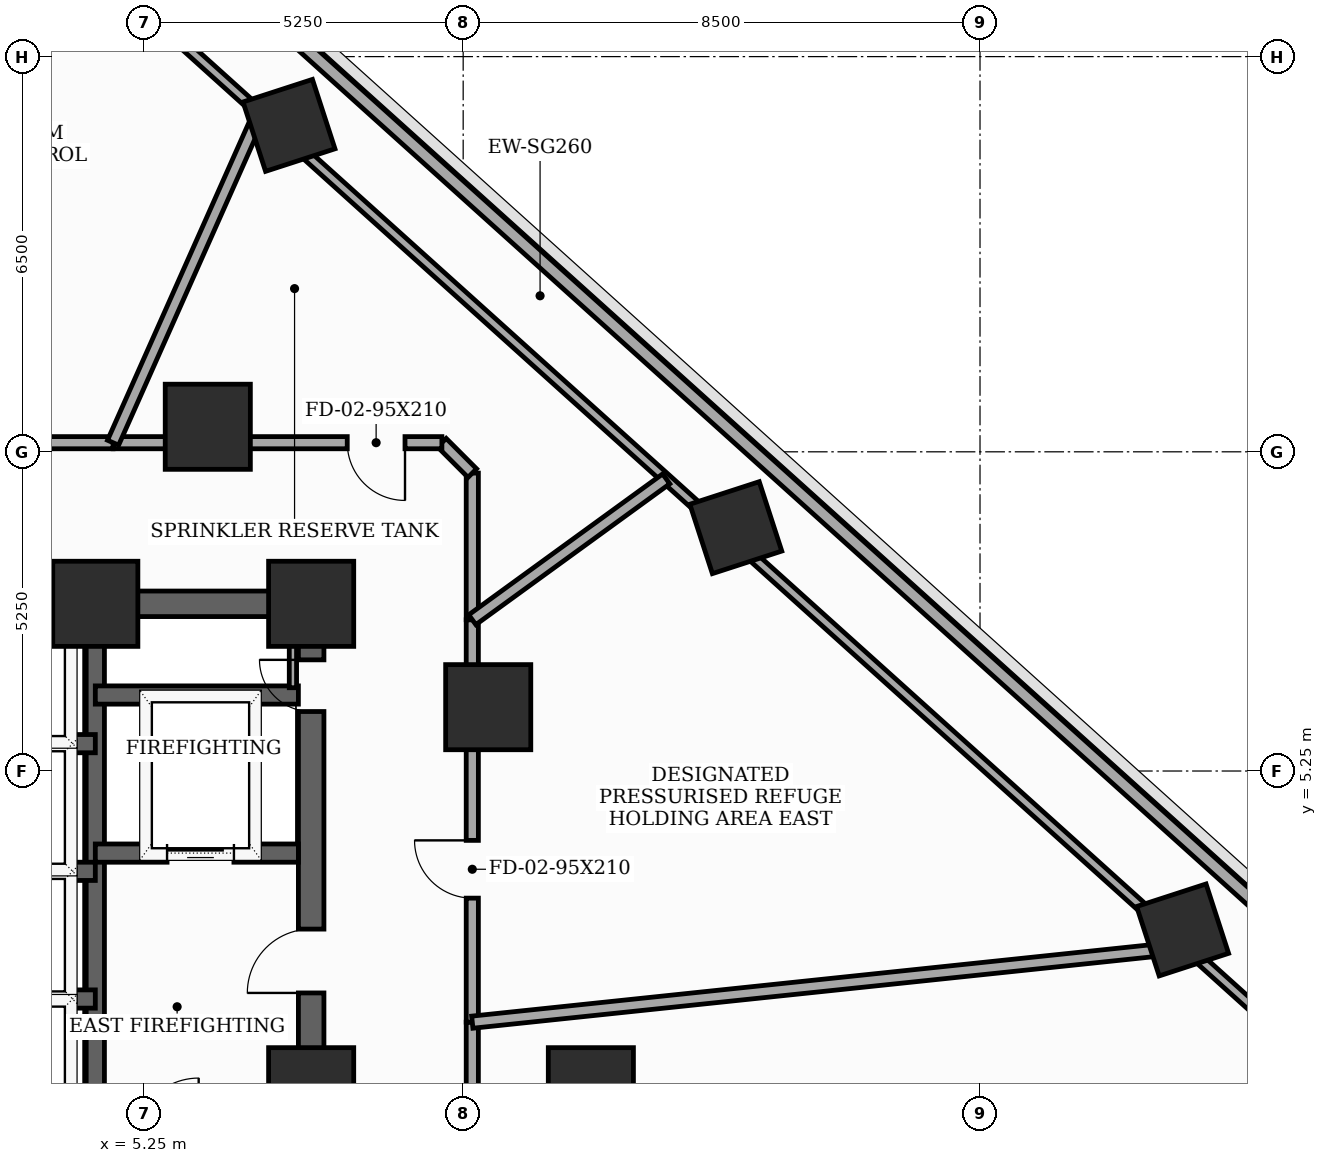
"""IFC4 building model, lengths in metres.
Left out: names, types, materials, properties, quantities, classifications, styles, units other than length and angle.
Written with IfcOpenShell. Run it as: python <this file> out.ifc"""

import sys

from ifc_helpers import new_model, si_unit, direction, frame, frame_2d, origin, origin_2d, place, context, subcontext, project, spatial, rectangle, extrude, element, fill, save


model = new_model("IFC4")
c1 = context("Model", 3, precision=1e-05, world=origin(), true_north=direction((0.0, 1.0)))
c2 = subcontext(c1, "Body", "Model", "MODEL_VIEW")
j1 = project(units=[si_unit("LENGTHUNIT", "METRE"), si_unit("PLANEANGLEUNIT", "RADIAN")], contexts=[c1])
p1 = place(None, origin())
s1 = spatial("IfcSite", under=j1, at=p1, CompositionType="ELEMENT")
p2 = place(p1, origin())
s2 = spatial("IfcBuilding", under=s1, at=p2, CompositionType="ELEMENT")
p3 = place(p2, frame((0.0, 0.0, 85.2)))
s3 = spatial("IfcBuildingStorey", under=s2, at=p3, CompositionType="ELEMENT", Elevation=85.2)
for number, where, z_axis, x_axis in (
    (1, (8.0, 0.0, 0.0), (0.0, 0.0, 1.0), (1.0, 0.0, 0.0)),
    (2, (8.0, 8.0, 0.0), (0.0, 0.0, 1.0), (1.0, 0.0, 0.0)),
    (3, (4.45, 8.0, 0.0), (0.0, 0.0, 1.0), (1.0, 0.0, 0.0)),
    (4, (12.6, 0.0, 0.0), (0.0, 0.0, 1.0), (1.0, 0.0, 0.0)),
    (5, (10.912, 6.3, 0.0), (0.0, 0.0, 1.0), (1.0, 0.0, 0.0)),
    (6, (6.3, 10.912, 0.0), (0.0, 0.0, 1.0), (1.0, 0.0, 0.0)),
):
    element("IfcColumn", number, at=place(p3, frame(where, z_axis=z_axis, x_axis=x_axis)), inside=s3, PredefinedType="COLUMN", context=c2, shape_type="SweptSolid", body=[
        extrude(rectangle(XDim=1.4, YDim=1.4, at=origin_2d()), origin(), (0.0, 0.0, 1.0), 5.1),
    ])
for number, where, z_axis, x_axis in (
    (7, (22.332, 2.636, 0.0), (0.0, 0.0, 1.0), (0.951, 0.309, 0.0)),
    (8, (14.984, 9.252, 0.0), (0.0, 0.0, 1.0), (0.951, 0.309, 0.0)),
    (9, (7.635, 15.869, 0.0), (0.0, 0.0, 1.0), (0.951, 0.309, 0.0)),
):
    element("IfcColumn", number, at=place(p3, frame(where, z_axis=z_axis, x_axis=x_axis)), inside=s3, PredefinedType="COLUMN", context=c2, shape_type="SweptSolid", body=[
        extrude(rectangle(XDim=1.2, YDim=1.2, at=origin_2d()), origin(), (0.0, 0.0, 1.0), 5.1),
    ])
p4 = place(p3, frame((30.436, -3.14, 0.0), z_axis=(0.0, 0.0, 1.0), x_axis=(-0.743144101168, 0.669131410785, 0.0)))
e10 = element("IfcWall", 10, at=p4, inside=s3, PredefinedType="SOLIDWALL", context=c2, shape_type="SweptSolid", body=[
    extrude(rectangle(XDim=49.44, YDim=0.22, at=frame_2d((24.72, 0.0))), origin(), (0.0, 0.0, 1.0), 4.4),
])
p5 = place(p3, frame((8.0, -8.0, 0.0), z_axis=(0.0, 0.0, 1.0), x_axis=(0.0, 1.0, 0.0)))
e11 = element("IfcWall", 11, at=p5, inside=s3, PredefinedType="SHEAR", context=c2, shape_type="SweptSolid", body=[
    extrude(rectangle(XDim=16.0, YDim=0.42, at=frame_2d((8.0, 0.0))), origin(), (0.0, 0.0, 1.0), 4.9),
])
p6 = place(p5, frame((9.6, 0.0, 0.0)))
e12 = element("IfcOpeningElement", 12, at=p6, cuts=e11, PredefinedType="OPENING", context=c2, shape_type="SweptSolid", body=[
    extrude(rectangle(XDim=1.05, YDim=2.15, at=frame_2d((0.525, 1.075))), frame((0.0, 0.22, 0.0), z_axis=(0.0, -1.0, 0.0), x_axis=(1.0, 0.0, 0.0)), (0.0, 0.0, 1.0), 0.44),
])
p7 = place(p5, frame((14.229, 0.0, 0.0)))
e13 = element("IfcOpeningElement", 13, at=p7, cuts=e11, PredefinedType="OPENING", context=c2, shape_type="SweptSolid", body=[
    extrude(rectangle(XDim=0.85, YDim=2.02, at=frame_2d((0.425, 1.01))), frame((0.0, 0.22, 0.0), z_axis=(0.0, -1.0, 0.0), x_axis=(1.0, 0.0, 0.0)), (0.0, 0.0, 1.0), 0.44),
])
p8 = place(p3, frame((-8.0, 8.0, 0.0), z_axis=(0.0, 0.0, 1.0), x_axis=(1.0, 0.0, 0.0)))
e14 = element("IfcWall", 14, at=p8, inside=s3, PredefinedType="SHEAR", context=c2, shape_type="SweptSolid", body=[
    extrude(rectangle(XDim=16.0, YDim=0.42, at=frame_2d((8.0, 0.0))), origin(), (0.0, 0.0, 1.0), 4.9),
])
p9 = place(p8, frame((7.1, 0.0, 0.0)))
e15 = element("IfcOpeningElement", 15, at=p9, cuts=e14, PredefinedType="OPENING", context=c2, shape_type="SweptSolid", body=[
    extrude(rectangle(XDim=1.8, YDim=2.15, at=frame_2d((0.9, 1.075))), frame((0.0, 0.22, 0.0), z_axis=(0.0, -1.0, 0.0), x_axis=(1.0, 0.0, 0.0)), (0.0, 0.0, 1.0), 0.44),
])
p10 = place(p3, frame((4.45, -7.79, 0.0), z_axis=(0.0, 0.0, 1.0), x_axis=(0.0, 1.0, 0.0)))
e16 = element("IfcWall", 16, at=p10, inside=s3, PredefinedType="SHEAR", context=c2, shape_type="SweptSolid", body=[
    extrude(rectangle(XDim=15.58, YDim=0.3, at=frame_2d((7.79, 0.0))), origin(), (0.0, 0.0, 1.0), 4.9),
])
p11 = place(p3, frame((4.45, 3.9, 0.0), z_axis=(0.0, 0.0, 1.0), x_axis=(1.0, 0.0, 0.0)))
e17 = element("IfcWall", 17, at=p11, inside=s3, PredefinedType="SHEAR", context=c2, shape_type="SweptSolid", body=[
    extrude(rectangle(XDim=3.34, YDim=0.3, at=frame_2d((1.67, 0.0))), origin(), (0.0, 0.0, 1.0), 4.9),
])
p12 = place(p11, frame((1.18, 0.0, 0.0)))
e18 = element("IfcOpeningElement", 18, at=p12, cuts=e17, PredefinedType="OPENING", context=c2, shape_type="SweptSolid", body=[
    extrude(rectangle(XDim=1.1, YDim=2.1, at=frame_2d((0.55, 1.05))), frame((0.0, 0.16, 0.0), z_axis=(0.0, -1.0, 0.0), x_axis=(1.0, 0.0, 0.0)), (0.0, 0.0, 1.0), 0.32),
])
p13 = place(p3, frame((4.45, 6.5, 0.0), z_axis=(0.0, 0.0, 1.0), x_axis=(1.0, 0.0, 0.0)))
e19 = element("IfcWall", 19, at=p13, inside=s3, PredefinedType="SHEAR", context=c2, shape_type="SweptSolid", body=[
    extrude(rectangle(XDim=3.34, YDim=0.3, at=frame_2d((1.67, 0.0))), origin(), (0.0, 0.0, 1.0), 4.9),
])
for number, where, z_axis, x_axis in (
    (20, (1.68, 1.5, 0.0), (0.0, 0.0, 1.0), (1.0, 0.0, 0.0)),
    (21, (1.68, 3.6, 0.0), (0.0, 0.0, 1.0), (1.0, 0.0, 0.0)),
    (22, (1.68, 5.7, 0.0), (0.0, 0.0, 1.0), (1.0, 0.0, 0.0)),
):
    element("IfcWall", number, at=place(p3, frame(where, z_axis=z_axis, x_axis=x_axis)), inside=s3, PredefinedType="SHEAR", context=c2, shape_type="SweptSolid", body=[
        extrude(rectangle(XDim=2.77, YDim=0.3, at=frame_2d((1.385, 0.0))), origin(), (0.0, 0.0, 1.0), 4.9),
    ])
p14 = place(p3, frame((-7.036, 28.85, 0.0), z_axis=(0.0, 0.0, 1.0), x_axis=(0.743144937383, -0.669130482075, 0.0)))
e23 = element("IfcWall", 23, at=p14, inside=s3, PredefinedType="SOLIDWALL", context=c2, shape_type="SweptSolid", body=[
    extrude(rectangle(XDim=49.066, YDim=0.16, at=frame_2d((24.533, 0.0))), origin(), (0.0, 0.0, 1.0), 3.485),
])
p15 = place(p3, frame((10.65, -4.742, 0.0), z_axis=(0.0, 0.0, 1.0), x_axis=(0.0, 1.0, 0.0)))
e24 = element("IfcWall", 24, at=p15, inside=s3, PredefinedType="SOLIDWALL", context=c2, shape_type="SweptSolid", body=[
    extrude(rectangle(XDim=5.861, YDim=0.2, at=frame_2d((2.93, 0.0))), origin(), (0.0, 0.0, 1.0), 4.285),
])
p16 = place(p15, frame((2.456, 0.0, 0.0)))
e25 = element("IfcOpeningElement", 25, at=p16, cuts=e24, PredefinedType="OPENING", context=c2, shape_type="SweptSolid", body=[
    extrude(rectangle(XDim=0.95, YDim=2.1, at=frame_2d((0.475, 1.05))), frame((0.0, 0.11, 0.0), z_axis=(0.0, -1.0, 0.0), x_axis=(1.0, 0.0, 0.0)), (0.0, 0.0, 1.0), 0.22),
])
p17 = place(p3, frame((10.65, 1.119, 0.0), z_axis=(0.0, 0.0, 1.0), x_axis=(0.0, 1.0, 0.0)))
e26 = element("IfcWall", 26, at=p17, inside=s3, PredefinedType="SOLIDWALL", context=c2, shape_type="SweptSolid", body=[
    extrude(rectangle(XDim=6.619, YDim=0.2, at=frame_2d((3.31, 0.0))), origin(), (0.0, 0.0, 1.0), 3.485),
])
p18 = place(p17, frame((2.04, 0.0, 0.0)))
e27 = element("IfcOpeningElement", 27, at=p18, cuts=e26, PredefinedType="OPENING", context=c2, shape_type="SweptSolid", body=[
    extrude(rectangle(XDim=0.95, YDim=2.1, at=frame_2d((0.475, 1.05))), frame((0.0, 0.11, 0.0), z_axis=(0.0, -1.0, 0.0), x_axis=(1.0, 0.0, 0.0)), (0.0, 0.0, 1.0), 0.22),
])
p19 = place(p3, frame((10.65, 7.738, 0.0), z_axis=(0.0, 0.0, 1.0), x_axis=(0.0, 1.0, 0.0)))
e28 = element("IfcWall", 28, at=p19, inside=s3, PredefinedType="SOLIDWALL", context=c2, shape_type="SweptSolid", body=[
    extrude(rectangle(XDim=2.412, YDim=0.2, at=frame_2d((1.206, 0.0))), origin(), (0.0, 0.0, 1.0), 4.615),
])
p20 = place(p3, frame((10.65, 10.15, 0.0), z_axis=(0.0, 0.0, 1.0), x_axis=(-0.707106781187, 0.707106781187, 0.0)))
e29 = element("IfcWall", 29, at=p20, inside=s3, PredefinedType="SOLIDWALL", context=c2, shape_type="SweptSolid", body=[
    extrude(rectangle(XDim=0.707, YDim=0.2, at=frame_2d((0.354, 0.0))), origin(), (0.0, 0.0, 1.0), 4.615),
])
p21 = place(p3, frame((10.15, 10.65, 0.0), z_axis=(0.0, 0.0, 1.0), x_axis=(-1.0, 0.0, 0.0)))
e30 = element("IfcWall", 30, at=p21, inside=s3, PredefinedType="SOLIDWALL", context=c2, shape_type="SweptSolid", body=[
    extrude(rectangle(XDim=5.408, YDim=0.2, at=frame_2d((2.704, 0.0))), origin(), (0.0, 0.0, 1.0), 4.285),
])
p22 = place(p21, frame((0.607, 0.0, 0.0)))
e31 = element("IfcOpeningElement", 31, at=p22, cuts=e30, PredefinedType="OPENING", context=c2, shape_type="SweptSolid", body=[
    extrude(rectangle(XDim=0.95, YDim=2.1, at=frame_2d((0.475, 1.05))), frame((0.0, 0.11, 0.0), z_axis=(0.0, -1.0, 0.0), x_axis=(1.0, 0.0, 0.0)), (0.0, 0.0, 1.0), 0.22),
])
p23 = place(p3, frame((4.742, 10.65, 0.0), z_axis=(0.0, 0.0, 1.0), x_axis=(-1.0, 0.0, 0.0)))
e32 = element("IfcWall", 32, at=p23, inside=s3, PredefinedType="SOLIDWALL", context=c2, shape_type="SweptSolid", body=[
    extrude(rectangle(XDim=5.861, YDim=0.2, at=frame_2d((2.93, 0.0))), origin(), (0.0, 0.0, 1.0), 4.285),
])
p24 = place(p23, frame((2.456, 0.0, 0.0)))
e33 = element("IfcOpeningElement", 33, at=p24, cuts=e32, PredefinedType="OPENING", context=c2, shape_type="SweptSolid", body=[
    extrude(rectangle(XDim=0.95, YDim=2.1, at=frame_2d((0.475, 1.05))), frame((0.0, 0.11, 0.0), z_axis=(0.0, -1.0, 0.0), x_axis=(1.0, 0.0, 0.0)), (0.0, 0.0, 1.0), 0.22),
])
p25 = place(p3, frame((22.392, 2.353, 0.0), z_axis=(0.0, 0.0, 1.0), x_axis=(-0.994522321836, -0.104524405615, 0.0)))
e34 = element("IfcWall", 34, at=p25, inside=s3, PredefinedType="SOLIDWALL", context=c2, shape_type="SweptSolid", body=[
    extrude(rectangle(XDim=11.807, YDim=0.2, at=frame_2d((5.904, 0.0))), origin(), (0.0, 0.0, 1.0), 3.485),
])
p26 = place(p3, frame((13.839, 10.055, 0.0), z_axis=(0.0, 0.0, 1.0), x_axis=(-0.809041292261, -0.587751807667, 0.0)))
e35 = element("IfcWall", 35, at=p26, inside=s3, PredefinedType="SOLIDWALL", context=c2, shape_type="SweptSolid", body=[
    extrude(rectangle(XDim=3.942, YDim=0.2, at=frame_2d((1.971, 0.0))), origin(), (0.0, 0.0, 1.0), 3.485),
])
p27 = place(p3, frame((7.156, 16.072, 0.0), z_axis=(0.0, 0.0, 1.0), x_axis=(-0.406733763825, -0.913546739562, 0.0)))
e36 = element("IfcWall", 36, at=p27, inside=s3, PredefinedType="SOLIDWALL", context=c2, shape_type="SweptSolid", body=[
    extrude(rectangle(XDim=5.935, YDim=0.2, at=frame_2d((2.968, 0.0))), origin(), (0.0, 0.0, 1.0), 3.485),
])
p28 = place(p3, frame((7.7, 6.62, 0.0), z_axis=(0.0, 0.0, 1.0), x_axis=(0.0, 1.0, 0.0)))
e37 = element("IfcWall", 37, at=p28, inside=s3, PredefinedType="PLUMBINGWALL", context=c2, shape_type="SweptSolid", body=[
    extrude(rectangle(XDim=1.13, YDim=0.12, at=frame_2d((0.565, 0.0))), origin(), (0.0, 0.0, 1.0), 4.9),
])
p29 = place(p6, origin())
e38 = element("IfcDoor", 38, at=p29, inside=s3, OperationType="SINGLE_SWING_LEFT", PredefinedType="DOOR", context=c2, shape_type="SweptSolid", body=[
    extrude(rectangle(XDim=1.05, YDim=2.15, at=frame_2d((0.525, 1.075))), frame((0.0, 0.025, 0.0), z_axis=(0.0, -1.0, 0.0), x_axis=(1.0, 0.0, 0.0)), (0.0, 0.0, 1.0), 0.05),
])
fill(e12, e38)
p30 = place(p7, origin())
e39 = element("IfcDoor", 39, at=p30, inside=s3, OperationType="SINGLE_SWING_RIGHT", PredefinedType="TRAPDOOR", context=c2, shape_type="SweptSolid", body=[
    extrude(rectangle(XDim=0.85, YDim=2.02, at=frame_2d((0.425, 1.01))), frame((0.0, 0.025, 0.0), z_axis=(0.0, -1.0, 0.0), x_axis=(1.0, 0.0, 0.0)), (0.0, 0.0, 1.0), 0.05),
])
fill(e13, e39)
p31 = place(p12, origin())
e40 = element("IfcDoor", 40, at=p31, inside=s3, OperationType="SLIDING_TO_LEFT", PredefinedType="DOOR", context=c2, shape_type="SweptSolid", body=[
    extrude(rectangle(XDim=1.1, YDim=2.1, at=frame_2d((0.55, 1.05))), frame((0.0, 0.025, 0.0), z_axis=(0.0, -1.0, 0.0), x_axis=(1.0, 0.0, 0.0)), (0.0, 0.0, 1.0), 0.05),
])
fill(e18, e40)
p32 = place(p18, origin())
e41 = element("IfcDoor", 41, at=p32, inside=s3, OperationType="SINGLE_SWING_RIGHT", PredefinedType="DOOR", context=c2, shape_type="SweptSolid", body=[
    extrude(rectangle(XDim=0.95, YDim=2.1, at=frame_2d((0.475, 1.05))), frame((0.0, 0.025, 0.0), z_axis=(0.0, -1.0, 0.0), x_axis=(1.0, 0.0, 0.0)), (0.0, 0.0, 1.0), 0.05),
])
fill(e27, e41)
p33 = place(p22, origin())
e42 = element("IfcDoor", 42, at=p33, inside=s3, OperationType="SINGLE_SWING_LEFT", PredefinedType="DOOR", context=c2, shape_type="SweptSolid", body=[
    extrude(rectangle(XDim=0.95, YDim=2.1, at=frame_2d((0.475, 1.05))), frame((0.0, 0.025, 0.0), z_axis=(0.0, -1.0, 0.0), x_axis=(1.0, 0.0, 0.0)), (0.0, 0.0, 1.0), 0.05),
])
fill(e31, e42)
save(model, sys.argv[1])
